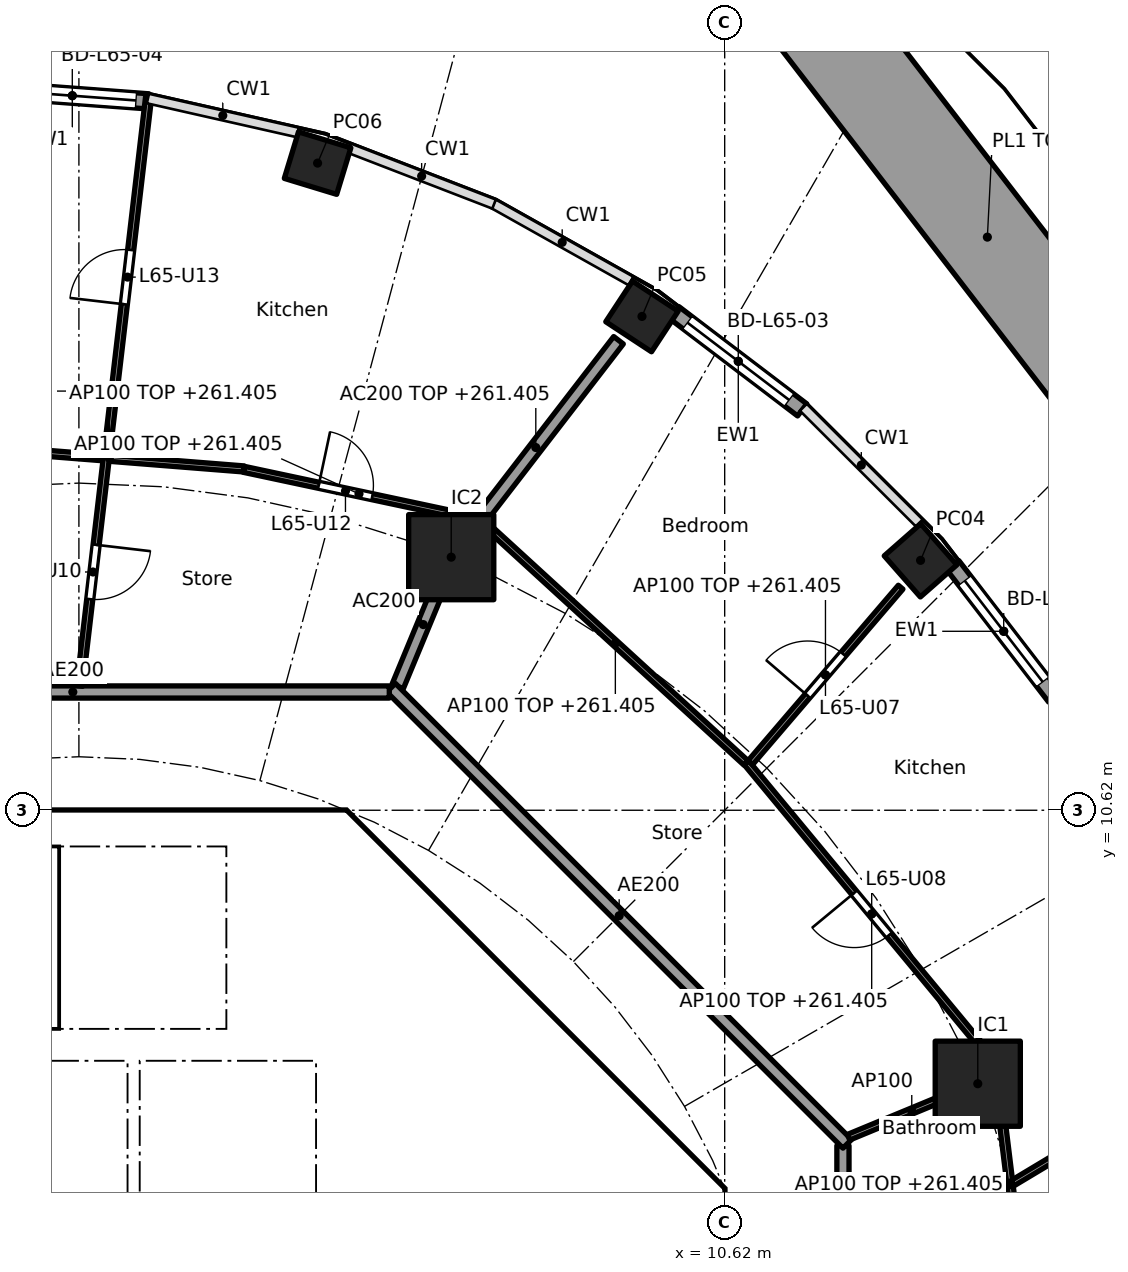
"""IFC4 building model, lengths in metres.
Left out: names, types, materials, properties, quantities, classifications, styles, units other than length and angle.
Written with IfcOpenShell. Run it as: python <this file> out.ifc"""

import sys

from ifc_helpers import new_model, si_unit, direction, frame, frame_2d, origin, origin_2d, place, context, subcontext, project, spatial, polyline, rectangle, hollow_rectangle, outline, extrude, element, fill, save


model = new_model("IFC4")
c1 = context("Model", 3, precision=1e-05, world=origin(), true_north=direction((0.0, 1.0)))
c2 = subcontext(c1, "Body", "Model", "MODEL_VIEW")
j1 = project(units=[si_unit("LENGTHUNIT", "METRE"), si_unit("PLANEANGLEUNIT", "RADIAN")], contexts=[c1])
p1 = place(None, origin())
s1 = spatial("IfcSite", under=j1, at=p1, CompositionType="ELEMENT")
p2 = place(p1, origin())
s2 = spatial("IfcBuilding", under=s1, at=p2, CompositionType="ELEMENT")
p3 = place(p2, frame((0.0, 0.0, 258.5)))
s3 = spatial("IfcBuildingStorey", under=s2, at=p3, CompositionType="ELEMENT", Elevation=258.5)
for number, where, z_axis, x_axis in (
    (1, (13.841, 14.73, -0.26), (0.0, 0.0, 1.0), (-0.66, 0.751, 0.0)),
    (2, (9.26, 18.741, -0.26), (0.0, 0.0, 1.0), (-0.836, 0.549, 0.0)),
    (3, (3.925, 21.262, -0.26), (0.0, 0.0, 1.0), (-0.957, 0.292, 0.0)),
):
    element("IfcColumn", number, at=place(p3, frame(where, z_axis=z_axis, x_axis=x_axis)), inside=s3, PredefinedType="COLUMN", context=c2, shape_type="SweptSolid", body=[
        extrude(hollow_rectangle(XDim=0.9, YDim=0.8, WallThickness=0.028, at=origin_2d()), origin(), (0.0, 0.0, 1.0), 3.96),
    ])
for number, where, z_axis, x_axis in (
    (4, (14.782, 6.123, 0.0), (0.0, 0.0, 1.0), (1.0, 0.0, 0.0)),
    (5, (6.123, 14.782, 0.0), (0.0, 0.0, 1.0), (1.0, 0.0, 0.0)),
):
    element("IfcColumn", number, at=place(p3, frame(where, z_axis=z_axis, x_axis=x_axis)), inside=s3, PredefinedType="COLUMN", context=c2, shape_type="SweptSolid", body=[
        extrude(rectangle(XDim=1.4, YDim=1.4, at=origin_2d()), origin(), (0.0, 0.0, 1.0), 3.7),
    ])
p4 = place(p3, frame((14.37, 14.65, 0.0), z_axis=(0.0, 0.0, 1.0), x_axis=(0.610475325435, -0.79203527512, 0.0)))
e6 = element("IfcWall", 6, at=p4, inside=s3, PredefinedType="SOLIDWALL", context=c2, shape_type="SweptSolid", body=[
    extrude(rectangle(XDim=2.746, YDim=0.25, at=frame_2d((1.373, 0.0))), origin(), (0.0, 0.0, 1.0), 3.44),
])
p5 = place(p4, frame((0.323, 0.0, 0.0)))
e7 = element("IfcOpeningElement", 7, at=p5, cuts=e6, PredefinedType="OPENING", context=c2, shape_type="SweptSolid", body=[
    extrude(rectangle(XDim=2.1, YDim=2.4, at=frame_2d((1.05, 1.2))), frame((0.0, 0.135, 0.0), z_axis=(0.0, -1.0, 0.0), x_axis=(1.0, 0.0, 0.0)), (0.0, 0.0, 1.0), 0.27),
])
p6 = place(p3, frame((9.792, 18.802, 0.0), z_axis=(0.0, 0.0, 1.0), x_axis=(0.796010739377, -0.605282498339, 0.0)))
e8 = element("IfcWall", 8, at=p6, inside=s3, PredefinedType="SOLIDWALL", context=c2, shape_type="SweptSolid", body=[
    extrude(rectangle(XDim=2.641, YDim=0.25, at=frame_2d((1.32, 0.0))), origin(), (0.0, 0.0, 1.0), 3.44),
])
p7 = place(p6, frame((0.27, 0.0, 0.0)))
e9 = element("IfcOpeningElement", 9, at=p7, cuts=e8, PredefinedType="OPENING", context=c2, shape_type="SweptSolid", body=[
    extrude(rectangle(XDim=2.1, YDim=2.4, at=frame_2d((1.05, 1.2))), frame((0.0, 0.135, 0.0), z_axis=(0.0, -1.0, 0.0), x_axis=(1.0, 0.0, 0.0)), (0.0, 0.0, 1.0), 0.27),
])
p8 = place(p3, frame((-1.361, 22.464, 0.0), z_axis=(0.0, 0.0, 1.0), x_axis=(0.997229684519, -0.074383844448, 0.0)))
e10 = element("IfcWall", 10, at=p8, inside=s3, PredefinedType="SOLIDWALL", context=c2, shape_type="SweptSolid", body=[
    extrude(rectangle(XDim=2.511, YDim=0.25, at=frame_2d((1.255, 0.0))), origin(), (0.0, 0.0, 1.0), 3.44),
])
p9 = place(p8, frame((0.205, 0.0, 0.0)))
e11 = element("IfcOpeningElement", 11, at=p9, cuts=e10, PredefinedType="OPENING", context=c2, shape_type="SweptSolid", body=[
    extrude(rectangle(XDim=2.1, YDim=2.4, at=frame_2d((1.05, 1.2))), frame((0.0, 0.135, 0.0), z_axis=(0.0, -1.0, 0.0), x_axis=(1.0, 0.0, 0.0)), (0.0, 0.0, 1.0), 0.27),
])
p10 = place(p3, frame((12.091, 23.743, 0.0), z_axis=(0.0, 0.0, 1.0), x_axis=(0.61025018564, -0.792208754639, 0.0)))
e12 = element("IfcWall", 12, at=p10, inside=s3, PredefinedType="SOLIDWALL", context=c2, shape_type="SweptSolid", body=[
    extrude(rectangle(XDim=9.337, YDim=1.6, at=frame_2d((4.668, 0.0))), origin(), (0.0, 0.0, 1.0), 1.1),
])
p11 = place(p3, frame((9.988, 4.613, 0.0), z_axis=(0.0, 0.0, 1.0), x_axis=(-0.707106781187, 0.707106781187, 0.0)))
e13 = element("IfcWall", 13, at=p11, inside=s3, PredefinedType="SHEAR", context=c2, shape_type="SweptSolid", body=[
    extrude(rectangle(XDim=7.602, YDim=0.6, at=frame_2d((3.801, 0.0))), origin(), (0.0, 0.0, 1.0), 3.44),
])
p12 = place(p11, frame((3.201, 0.0, 0.0)))
e14 = element("IfcOpeningElement", 14, at=p12, cuts=e13, PredefinedType="OPENING", context=c2, shape_type="SweptSolid", body=[
    extrude(rectangle(XDim=1.2, YDim=2.1, at=frame_2d((0.6, 1.05))), frame((0.0, 0.31, 0.0), z_axis=(0.0, -1.0, 0.0), x_axis=(1.0, 0.0, 0.0)), (0.0, 0.0, 1.0), 0.62),
])
p13 = place(p3, frame((4.0, 4.3, 0.0), z_axis=(0.0, 0.0, 1.0), x_axis=(0.0, 1.0, 0.0)))
e15 = element("IfcWall", 15, at=p13, inside=s3, PredefinedType="SOLIDWALL", context=c2, shape_type="SweptSolid", body=[
    extrude(rectangle(XDim=2.2, YDim=0.2, at=frame_2d((1.1, 0.0))), origin(), (0.0, 0.0, 1.0), 3.44),
])
p14 = place(p13, frame((0.55, 0.0, 0.0)))
e16 = element("IfcOpeningElement", 16, at=p14, cuts=e15, PredefinedType="OPENING", context=c2, shape_type="SweptSolid", body=[
    extrude(rectangle(XDim=1.1, YDim=2.1, at=frame_2d((0.55, 1.05))), frame((0.0, 0.11, 0.0), z_axis=(0.0, -1.0, 0.0), x_axis=(1.0, 0.0, 0.0)), (0.0, 0.0, 1.0), 0.22),
])
p15 = place(p3, frame((4.0, 7.025, 0.0), z_axis=(0.0, 0.0, 1.0), x_axis=(0.0, 1.0, 0.0)))
e17 = element("IfcWall", 17, at=p15, inside=s3, PredefinedType="SOLIDWALL", context=c2, shape_type="SweptSolid", body=[
    extrude(rectangle(XDim=3.0, YDim=0.2, at=frame_2d((1.5, 0.0))), origin(), (0.0, 0.0, 1.0), 3.44),
])
p16 = place(p15, frame((0.925, 0.0, 0.0)))
e18 = element("IfcOpeningElement", 18, at=p16, cuts=e17, PredefinedType="OPENING", context=c2, shape_type="SweptSolid", body=[
    extrude(rectangle(XDim=1.1, YDim=2.1, at=frame_2d((0.55, 1.05))), frame((0.0, 0.11, 0.0), z_axis=(0.0, -1.0, 0.0), x_axis=(1.0, 0.0, 0.0)), (0.0, 0.0, 1.0), 0.22),
])
p17 = place(p3, origin())
e19 = element("IfcWall", 19, at=p17, inside=s3, PredefinedType="SHEAR", context=c2, shape_type="SweptSolid", body=[
    extrude(outline(polyline([(-4.152, 10.025), (-4.401, 9.776), (-4.825, 10.2), (-4.401, 10.625), (4.401, 10.625), (4.825, 10.2), (4.401, 9.776), (4.152, 10.025), (-4.152, 10.025)])), origin(), (0.0, 0.0, 1.0), 3.44),
])
p18 = place(p3, origin())
e20 = element("IfcWall", 20, at=p18, inside=s3, PredefinedType="SHEAR", context=c2, shape_type="SweptSolid", body=[
    extrude(outline(polyline([(9.776, -4.401), (10.025, -4.152), (10.025, -3.801), (10.025, 4.152), (9.776, 4.401), (10.2, 4.825), (10.625, 4.401), (10.625, -4.401), (10.2, -4.825), (9.776, -4.401)])), origin(), (0.0, 0.0, 1.0), 3.44),
])
p19 = place(p3, frame((0.9, 4.3, 0.0), z_axis=(0.0, 0.0, 1.0), x_axis=(0.0, 1.0, 0.0)))
e21 = element("IfcWall", 21, at=p19, inside=s3, PredefinedType="SOLIDWALL", context=c2, shape_type="SweptSolid", body=[
    extrude(rectangle(XDim=2.2, YDim=0.2, at=frame_2d((1.1, 0.0))), origin(), (0.0, 0.0, 1.0), 3.44),
])
p20 = place(p3, origin())
e22 = element("IfcWall", 22, at=p20, inside=s3, PredefinedType="SOLIDWALL", context=c2, shape_type="SweptSolid", body=[
    extrude(outline(polyline([(4.1, 6.5), (-4.1, 6.5), (-4.1, 7.025), (4.1, 7.025), (4.1, 6.5)])), origin(), (0.0, 0.0, 1.0), 3.44),
])
p21 = place(p3, frame((5.243, 12.657, 0.0), z_axis=(0.0, 0.0, 1.0), x_axis=(0.382691608661, 0.923876145736, 0.0)))
e23 = element("IfcWall", 23, at=p21, inside=s3, PredefinedType="PARTITIONING", context=c2, shape_type="SweptSolid", body=[
    extrude(rectangle(XDim=2.2, YDim=0.2, at=frame_2d((1.1, 0.0))), origin(), (0.0, 0.0, 1.0), 3.44),
])
p22 = place(p3, frame((6.154, 14.822, 0.0), z_axis=(0.0, 0.0, 1.0), x_axis=(0.610687612043, 0.791871606068, 0.0)))
e24 = element("IfcWall", 24, at=p22, inside=s3, PredefinedType="PARTITIONING", context=c2, shape_type="SweptSolid", body=[
    extrude(rectangle(XDim=4.455, YDim=0.2, at=frame_2d((2.228, 0.0))), origin(), (0.0, 0.0, 1.0), 2.905),
])
p23 = place(p3, frame((12.565, -5.104, 0.0), z_axis=(0.0, 0.0, 1.0), x_axis=(0.0, 1.0, 0.0)))
e25 = element("IfcWall", 25, at=p23, inside=s3, PredefinedType="PARTITIONING", context=c2, shape_type="SweptSolid", body=[
    extrude(rectangle(XDim=10.209, YDim=0.2, at=frame_2d((5.104, 0.0))), origin(), (0.0, 0.0, 1.0), 3.44),
])
p24 = place(p23, frame((4.604, 0.0, 0.0)))
e26 = element("IfcOpeningElement", 26, at=p24, cuts=e25, PredefinedType="OPENING", context=c2, shape_type="SweptSolid", body=[
    extrude(rectangle(XDim=1.0, YDim=2.1, at=frame_2d((0.5, 1.05))), frame((0.0, 0.11, 0.0), z_axis=(0.0, -1.0, 0.0), x_axis=(1.0, 0.0, 0.0)), (0.0, 0.0, 1.0), 0.22),
])
p25 = place(p3, frame((12.635, 5.134, 0.0), z_axis=(0.0, 0.0, 1.0), x_axis=(-0.707106781187, 0.707106781187, 0.0)))
e27 = element("IfcWall", 27, at=p25, inside=s3, PredefinedType="PARTITIONING", context=c2, shape_type="SweptSolid", body=[
    extrude(rectangle(XDim=10.609, YDim=0.2, at=frame_2d((5.305, 0.0))), origin(), (0.0, 0.0, 1.0), 3.44),
])
p26 = place(p3, frame((5.104, 12.565, 0.0), z_axis=(0.0, 0.0, 1.0), x_axis=(-1.0, 0.0, 0.0)))
e28 = element("IfcWall", 28, at=p26, inside=s3, PredefinedType="PARTITIONING", context=c2, shape_type="SweptSolid", body=[
    extrude(rectangle(XDim=10.409, YDim=0.2, at=frame_2d((5.205, 0.0))), origin(), (0.0, 0.0, 1.0), 3.44),
])
p27 = place(p26, frame((6.339, 0.0, 0.0)))
e29 = element("IfcOpeningElement", 29, at=p27, cuts=e28, PredefinedType="OPENING", context=c2, shape_type="SweptSolid", body=[
    extrude(rectangle(XDim=1.0, YDim=2.1, at=frame_2d((0.5, 1.05))), frame((0.0, 0.11, 0.0), z_axis=(0.0, -1.0, 0.0), x_axis=(1.0, 0.0, 0.0)), (0.0, 0.0, 1.0), 0.22),
])
p28 = place(p3, frame((15.552, 2.508, 0.0), z_axis=(0.0, 0.0, 1.0), x_axis=(-0.12196631785, 0.992534239868, 0.0)))
e30 = element("IfcWall", 30, at=p28, inside=s3, PredefinedType="PARTITIONING", context=c2, shape_type="SweptSolid", body=[
    extrude(rectangle(XDim=3.937, YDim=0.1, at=frame_2d((1.969, 0.0))), origin(), (0.0, 0.0, 1.0), 2.905),
])
p29 = place(p3, frame((15.355, 4.488, 0.0), z_axis=(0.0, 0.0, 1.0), x_axis=(0.85763237524, 0.514263268123, 0.0)))
e31 = element("IfcWall", 31, at=p29, inside=s3, PredefinedType="PARTITIONING", context=c2, shape_type="SweptSolid", body=[
    extrude(rectangle(XDim=4.324, YDim=0.1, at=frame_2d((2.162, 0.0))), origin(), (0.0, 0.0, 1.0), 2.983),
])
p30 = place(p29, frame((1.985, 0.0, 0.0)))
e32 = element("IfcOpeningElement", 32, at=p30, cuts=e31, PredefinedType="OPENING", context=c2, shape_type="SweptSolid", body=[
    extrude(rectangle(XDim=0.9, YDim=2.1, at=frame_2d((0.45, 1.05))), frame((0.0, 0.06, 0.0), z_axis=(0.0, -1.0, 0.0), x_axis=(1.0, 0.0, 0.0)), (0.0, 0.0, 1.0), 0.12),
])
p31 = place(p3, frame((12.657, 5.243, 0.0), z_axis=(0.0, 0.0, 1.0), x_axis=(0.923864733477, 0.382719158442, 0.0)))
e33 = element("IfcWall", 33, at=p31, inside=s3, PredefinedType="PARTITIONING", context=c2, shape_type="SweptSolid", body=[
    extrude(rectangle(XDim=2.25, YDim=0.1, at=frame_2d((1.125, 0.0))), origin(), (0.0, 0.0, 1.0), 3.44),
])
p32 = place(p3, frame((15.098, 6.427, 0.0), z_axis=(0.0, 0.0, 1.0), x_axis=(-0.637936555536, 0.770088924158, 0.0)))
e34 = element("IfcWall", 34, at=p32, inside=s3, PredefinedType="PARTITIONING", context=c2, shape_type="SweptSolid", body=[
    extrude(rectangle(XDim=6.46, YDim=0.1, at=frame_2d((3.23, 0.0))), origin(), (0.0, 0.0, 1.0), 2.905),
])
p33 = place(p32, frame((2.78, 0.0, 0.0)))
e35 = element("IfcOpeningElement", 35, at=p33, cuts=e34, PredefinedType="OPENING", context=c2, shape_type="SweptSolid", body=[
    extrude(rectangle(XDim=0.9, YDim=2.1, at=frame_2d((0.45, 1.05))), frame((0.0, 0.06, 0.0), z_axis=(0.0, -1.0, 0.0), x_axis=(1.0, 0.0, 0.0)), (0.0, 0.0, 1.0), 0.12),
])
p34 = place(p3, frame((11.041, 11.402, 0.0), z_axis=(0.0, 0.0, 1.0), x_axis=(0.650558544325, 0.759456108282, 0.0)))
e36 = element("IfcWall", 36, at=p34, inside=s3, PredefinedType="PARTITIONING", context=c2, shape_type="SweptSolid", body=[
    extrude(rectangle(XDim=3.8, YDim=0.1, at=frame_2d((1.9, 0.0))), origin(), (0.0, 0.0, 1.0), 2.905),
])
p35 = place(p34, frame((1.45, 0.0, 0.0)))
e37 = element("IfcOpeningElement", 37, at=p35, cuts=e36, PredefinedType="OPENING", context=c2, shape_type="SweptSolid", body=[
    extrude(rectangle(XDim=0.9, YDim=2.1, at=frame_2d((0.45, 1.05))), frame((0.0, 0.06, 0.0), z_axis=(0.0, -1.0, 0.0), x_axis=(1.0, 0.0, 0.0)), (0.0, 0.0, 1.0), 0.12),
])
p36 = place(p3, frame((10.972, 11.398, 0.0), z_axis=(0.0, 0.0, 1.0), x_axis=(-0.737830272434, 0.674986288069, 0.0)))
e38 = element("IfcWall", 38, at=p36, inside=s3, PredefinedType="PARTITIONING", context=c2, shape_type="SweptSolid", body=[
    extrude(rectangle(XDim=5.827, YDim=0.1, at=frame_2d((2.914, 0.0))), origin(), (0.0, 0.0, 1.0), 2.905),
])
p37 = place(p3, frame((6.5, 15.419, 0.0), z_axis=(0.0, 0.0, 1.0), x_axis=(-0.978053492557, 0.208353943321, 0.0)))
e39 = element("IfcWall", 39, at=p37, inside=s3, PredefinedType="PARTITIONING", context=c2, shape_type="SweptSolid", body=[
    extrude(rectangle(XDim=3.874, YDim=0.1, at=frame_2d((1.937, 0.0))), origin(), (0.0, 0.0, 1.0), 2.905),
])
p38 = place(p37, frame((1.714, 0.0, 0.0)))
e40 = element("IfcOpeningElement", 40, at=p38, cuts=e39, PredefinedType="OPENING", context=c2, shape_type="SweptSolid", body=[
    extrude(rectangle(XDim=0.9, YDim=2.1, at=frame_2d((0.45, 1.05))), frame((0.0, 0.06, 0.0), z_axis=(0.0, -1.0, 0.0), x_axis=(1.0, 0.0, 0.0)), (0.0, 0.0, 1.0), 0.12),
])
p39 = place(p3, frame((2.713, 16.233, 0.0), z_axis=(0.0, 0.0, 1.0), x_axis=(-0.996870142942, 0.079056423588, 0.0)))
e41 = element("IfcWall", 41, at=p39, inside=s3, PredefinedType="PARTITIONING", context=c2, shape_type="SweptSolid", body=[
    extrude(rectangle(XDim=4.438, YDim=0.1, at=frame_2d((2.219, 0.0))), origin(), (0.0, 0.0, 1.0), 2.905),
])
p40 = place(p3, frame((0.012, 12.664, 0.0), z_axis=(0.0, 0.0, 1.0), x_axis=(0.11636251357, 0.993206808996, 0.0)))
e42 = element("IfcWall", 42, at=p40, inside=s3, PredefinedType="PARTITIONING", context=c2, shape_type="SweptSolid", body=[
    extrude(rectangle(XDim=9.765, YDim=0.1, at=frame_2d((4.882, 0.0))), origin(), (0.0, 0.0, 1.0), 2.762),
])
p41 = place(p40, frame((1.437, 0.0, 0.0)))
e43 = element("IfcOpeningElement", 43, at=p41, cuts=e42, PredefinedType="OPENING", context=c2, shape_type="SweptSolid", body=[
    extrude(rectangle(XDim=0.9, YDim=2.1, at=frame_2d((0.45, 1.05))), frame((0.0, 0.06, 0.0), z_axis=(0.0, -1.0, 0.0), x_axis=(1.0, 0.0, 0.0)), (0.0, 0.0, 1.0), 0.12),
])
p42 = place(p40, frame((6.319, 0.0, 0.0)))
e44 = element("IfcOpeningElement", 44, at=p42, cuts=e42, PredefinedType="OPENING", context=c2, shape_type="SweptSolid", body=[
    extrude(rectangle(XDim=0.9, YDim=2.1, at=frame_2d((0.45, 1.05))), frame((0.0, 0.06, 0.0), z_axis=(0.0, -1.0, 0.0), x_axis=(1.0, 0.0, 0.0)), (0.0, 0.0, 1.0), 0.12),
])
p43 = place(p5, origin())
e45 = element("IfcDoor", 45, at=p43, inside=s3, OperationType="SLIDING_TO_LEFT", PredefinedType="DOOR", context=c2, shape_type="SweptSolid", body=[
    extrude(rectangle(XDim=2.1, YDim=2.4, at=frame_2d((1.05, 1.2))), frame((0.0, 0.025, 0.0), z_axis=(0.0, -1.0, 0.0), x_axis=(1.0, 0.0, 0.0)), (0.0, 0.0, 1.0), 0.05),
])
fill(e7, e45)
p44 = place(p7, origin())
e46 = element("IfcDoor", 46, at=p44, inside=s3, OperationType="SLIDING_TO_LEFT", PredefinedType="DOOR", context=c2, shape_type="SweptSolid", body=[
    extrude(rectangle(XDim=2.1, YDim=2.4, at=frame_2d((1.05, 1.2))), frame((0.0, 0.025, 0.0), z_axis=(0.0, -1.0, 0.0), x_axis=(1.0, 0.0, 0.0)), (0.0, 0.0, 1.0), 0.05),
])
fill(e9, e46)
p45 = place(p9, origin())
e47 = element("IfcDoor", 47, at=p45, inside=s3, OperationType="SLIDING_TO_LEFT", PredefinedType="DOOR", context=c2, shape_type="SweptSolid", body=[
    extrude(rectangle(XDim=2.1, YDim=2.4, at=frame_2d((1.05, 1.2))), frame((0.0, 0.025, 0.0), z_axis=(0.0, -1.0, 0.0), x_axis=(1.0, 0.0, 0.0)), (0.0, 0.0, 1.0), 0.05),
])
fill(e11, e47)
p46 = place(p14, origin())
e48 = element("IfcDoor", 48, at=p46, inside=s3, OperationType="DOUBLE_DOOR_SLIDING", PredefinedType="DOOR", context=c2, shape_type="SweptSolid", body=[
    extrude(rectangle(XDim=1.1, YDim=2.1, at=frame_2d((0.55, 1.05))), frame((0.0, 0.025, 0.0), z_axis=(0.0, -1.0, 0.0), x_axis=(1.0, 0.0, 0.0)), (0.0, 0.0, 1.0), 0.05),
])
fill(e16, e48)
p47 = place(p16, origin())
e49 = element("IfcDoor", 49, at=p47, inside=s3, OperationType="SINGLE_SWING_RIGHT", PredefinedType="DOOR", context=c2, shape_type="SweptSolid", body=[
    extrude(rectangle(XDim=1.1, YDim=2.1, at=frame_2d((0.55, 1.05))), frame((0.0, 0.025, 0.0), z_axis=(0.0, -1.0, 0.0), x_axis=(1.0, 0.0, 0.0)), (0.0, 0.0, 1.0), 0.05),
])
fill(e18, e49)
p48 = place(p12, origin())
e50 = element("IfcDoor", 50, at=p48, inside=s3, OperationType="SINGLE_SWING_LEFT", PredefinedType="DOOR", context=c2, shape_type="SweptSolid", body=[
    extrude(rectangle(XDim=1.2, YDim=2.1, at=frame_2d((0.6, 1.05))), frame((0.0, 0.025, 0.0), z_axis=(0.0, -1.0, 0.0), x_axis=(1.0, 0.0, 0.0)), (0.0, 0.0, 1.0), 0.05),
])
fill(e14, e50)
p49 = place(p35, origin())
e51 = element("IfcDoor", 51, at=p49, inside=s3, OperationType="SINGLE_SWING_LEFT", PredefinedType="DOOR", context=c2, shape_type="SweptSolid", body=[
    extrude(rectangle(XDim=0.9, YDim=2.1, at=frame_2d((0.45, 1.05))), frame((0.0, 0.025, 0.0), z_axis=(0.0, -1.0, 0.0), x_axis=(1.0, 0.0, 0.0)), (0.0, 0.0, 1.0), 0.05),
])
fill(e37, e51)
p50 = place(p33, origin())
e52 = element("IfcDoor", 52, at=p50, inside=s3, OperationType="SINGLE_SWING_RIGHT", PredefinedType="DOOR", context=c2, shape_type="SweptSolid", body=[
    extrude(rectangle(XDim=0.9, YDim=2.1, at=frame_2d((0.45, 1.05))), frame((0.0, 0.025, 0.0), z_axis=(0.0, -1.0, 0.0), x_axis=(1.0, 0.0, 0.0)), (0.0, 0.0, 1.0), 0.05),
])
fill(e35, e52)
p51 = place(p41, frame((0.9, 0.0, 0.0), x_axis=(-1.0, 0.0, 0.0)))
e53 = element("IfcDoor", 53, at=p51, inside=s3, OperationType="SINGLE_SWING_LEFT", PredefinedType="DOOR", context=c2, shape_type="SweptSolid", body=[
    extrude(rectangle(XDim=0.9, YDim=2.1, at=frame_2d((0.45, 1.05))), frame((0.0, 0.025, 0.0), z_axis=(0.0, -1.0, 0.0), x_axis=(1.0, 0.0, 0.0)), (0.0, 0.0, 1.0), 0.05),
])
fill(e43, e53)
p52 = place(p38, frame((0.9, 0.0, 0.0), x_axis=(-1.0, 0.0, 0.0)))
e54 = element("IfcDoor", 54, at=p52, inside=s3, OperationType="SINGLE_SWING_LEFT", PredefinedType="DOOR", context=c2, shape_type="SweptSolid", body=[
    extrude(rectangle(XDim=0.9, YDim=2.1, at=frame_2d((0.45, 1.05))), frame((0.0, 0.025, 0.0), z_axis=(0.0, -1.0, 0.0), x_axis=(1.0, 0.0, 0.0)), (0.0, 0.0, 1.0), 0.05),
])
fill(e40, e54)
p53 = place(p42, origin())
e55 = element("IfcDoor", 55, at=p53, inside=s3, OperationType="SINGLE_SWING_LEFT", PredefinedType="DOOR", context=c2, shape_type="SweptSolid", body=[
    extrude(rectangle(XDim=0.9, YDim=2.1, at=frame_2d((0.45, 1.05))), frame((0.0, 0.025, 0.0), z_axis=(0.0, -1.0, 0.0), x_axis=(1.0, 0.0, 0.0)), (0.0, 0.0, 1.0), 0.05),
])
fill(e44, e55)
save(model, sys.argv[1])
